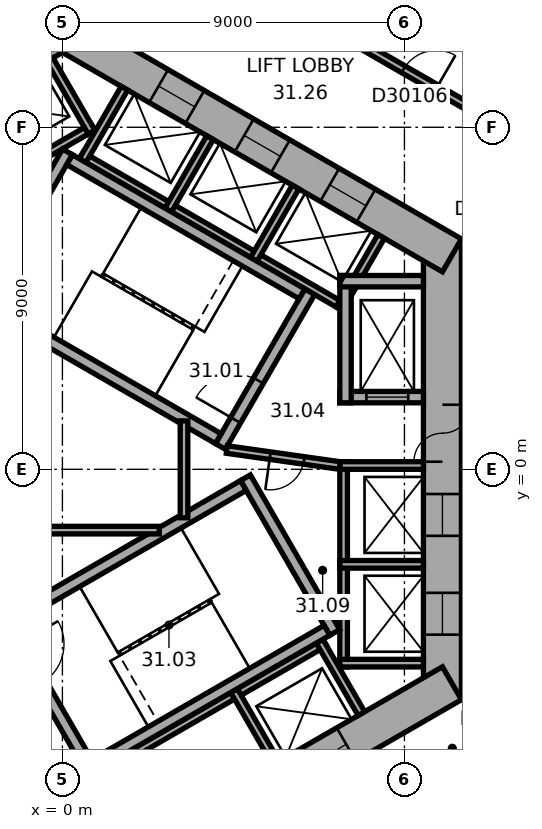
"""IFC4 building model, lengths in metres.
Left out: names, types, materials, properties, quantities, classifications, styles, units other than length and angle.
Written with IfcOpenShell. Run it as: python <this file> out.ifc"""

import sys

from ifc_helpers import new_model, si_unit, direction, frame, frame_2d, origin, place, context, subcontext, project, spatial, rectangle, extrude, element, fill, save


model = new_model("IFC4")
c1 = context("Model", 3, precision=1e-05, world=origin(), true_north=direction((0.0, 1.0)))
c2 = subcontext(c1, "Body", "Model", "MODEL_VIEW")
j1 = project(units=[si_unit("LENGTHUNIT", "METRE"), si_unit("PLANEANGLEUNIT", "RADIAN")], contexts=[c1])
p1 = place(None, origin())
s1 = spatial("IfcSite", under=j1, at=p1, CompositionType="ELEMENT")
p2 = place(p1, origin())
s2 = spatial("IfcBuilding", under=s1, at=p2, CompositionType="ELEMENT")
p3 = place(p2, frame((0.0, 0.0, 128.1)))
s3 = spatial("IfcBuildingStorey", under=s2, at=p3, CompositionType="ELEMENT", Elevation=128.1)
p4 = place(p3, frame((10.0, -6.062, 0.0), z_axis=(0.0, 0.0, 1.0), x_axis=(0.0, 1.0, 0.0)))
e1 = element("IfcWall", 1, at=p4, inside=s3, PredefinedType="SHEAR", context=c2, shape_type="SweptSolid", body=[
    extrude(rectangle(XDim=12.125, YDim=1.0, at=frame_2d((6.062, 0.0))), origin(), (0.0, 0.0, 1.0), 3.7),
])
p5 = place(p4, frame((6.262, 0.0, 0.0)))
e2 = element("IfcOpeningElement", 2, at=p5, cuts=e1, PredefinedType="OPENING", context=c2, shape_type="SweptSolid", body=[
    extrude(rectangle(XDim=1.5, YDim=2.1, at=frame_2d((0.75, 1.05))), frame((0.0, 0.51, 0.0), z_axis=(0.0, -1.0, 0.0), x_axis=(1.0, 0.0, 0.0)), (0.0, 0.0, 1.0), 1.02),
])
p6 = place(p4, frame((1.712, 0.0, 0.0)))
e3 = element("IfcOpeningElement", 3, at=p6, cuts=e1, PredefinedType="OPENING", context=c2, shape_type="SweptSolid", body=[
    extrude(rectangle(XDim=1.1, YDim=2.1, at=frame_2d((0.55, 1.05))), frame((0.0, 0.51, 0.0), z_axis=(0.0, -1.0, 0.0), x_axis=(1.0, 0.0, 0.0)), (0.0, 0.0, 1.0), 1.02),
])
p7 = place(p4, frame((4.312, 0.0, 0.0)))
e4 = element("IfcOpeningElement", 4, at=p7, cuts=e1, PredefinedType="OPENING", context=c2, shape_type="SweptSolid", body=[
    extrude(rectangle(XDim=1.1, YDim=2.1, at=frame_2d((0.55, 1.05))), frame((0.0, 0.51, 0.0), z_axis=(0.0, -1.0, 0.0), x_axis=(1.0, 0.0, 0.0)), (0.0, 0.0, 1.0), 1.02),
])
p8 = place(p3, frame((10.25, 5.629, 0.0), z_axis=(0.0, 0.0, 1.0), x_axis=(-0.866022616891, 0.50000482701, 0.0)))
e5 = element("IfcWall", 5, at=p8, inside=s3, PredefinedType="SHEAR", context=c2, shape_type="SweptSolid", body=[
    extrude(rectangle(XDim=12.125, YDim=1.0, at=frame_2d((6.062, 0.0))), origin(), (0.0, 0.0, 1.0), 3.7),
])
p9 = place(p8, frame((2.612, 0.0, 0.0)))
e6 = element("IfcOpeningElement", 6, at=p9, cuts=e5, PredefinedType="OPENING", context=c2, shape_type="SweptSolid", body=[
    extrude(rectangle(XDim=1.1, YDim=2.1, at=frame_2d((0.55, 1.05))), frame((0.0, 0.51, 0.0), z_axis=(0.0, -1.0, 0.0), x_axis=(1.0, 0.0, 0.0)), (0.0, 0.0, 1.0), 1.02),
])
p10 = place(p8, frame((5.212, 0.0, 0.0)))
e7 = element("IfcOpeningElement", 7, at=p10, cuts=e5, PredefinedType="OPENING", context=c2, shape_type="SweptSolid", body=[
    extrude(rectangle(XDim=1.1, YDim=2.1, at=frame_2d((0.55, 1.05))), frame((0.0, 0.51, 0.0), z_axis=(0.0, -1.0, 0.0), x_axis=(1.0, 0.0, 0.0)), (0.0, 0.0, 1.0), 1.02),
])
p11 = place(p8, frame((7.812, 0.0, 0.0)))
e8 = element("IfcOpeningElement", 8, at=p11, cuts=e5, PredefinedType="OPENING", context=c2, shape_type="SweptSolid", body=[
    extrude(rectangle(XDim=1.1, YDim=2.1, at=frame_2d((0.55, 1.05))), frame((0.0, 0.51, 0.0), z_axis=(0.0, -1.0, 0.0), x_axis=(1.0, 0.0, 0.0)), (0.0, 0.0, 1.0), 1.02),
])
p12 = place(p3, frame((0.25, 11.691, 0.0), z_axis=(0.0, 0.0, 1.0), x_axis=(-0.866022616891, -0.50000482701, 0.0)))
e9 = element("IfcWall", 9, at=p12, inside=s3, PredefinedType="SHEAR", context=c2, shape_type="SweptSolid", body=[
    extrude(rectangle(XDim=12.125, YDim=1.0, at=frame_2d((6.062, 0.0))), origin(), (0.0, 0.0, 1.0), 3.7),
])
p13 = place(p12, frame((6.262, 0.0, 0.0)))
e10 = element("IfcOpeningElement", 10, at=p13, cuts=e9, PredefinedType="OPENING", context=c2, shape_type="SweptSolid", body=[
    extrude(rectangle(XDim=1.5, YDim=2.1, at=frame_2d((0.75, 1.05))), frame((0.0, 0.51, 0.0), z_axis=(0.0, -1.0, 0.0), x_axis=(1.0, 0.0, 0.0)), (0.0, 0.0, 1.0), 1.02),
])
p14 = place(p12, frame((1.712, 0.0, 0.0)))
e11 = element("IfcOpeningElement", 11, at=p14, cuts=e9, PredefinedType="OPENING", context=c2, shape_type="SweptSolid", body=[
    extrude(rectangle(XDim=1.1, YDim=2.1, at=frame_2d((0.55, 1.05))), frame((0.0, 0.51, 0.0), z_axis=(0.0, -1.0, 0.0), x_axis=(1.0, 0.0, 0.0)), (0.0, 0.0, 1.0), 1.02),
])
p15 = place(p3, frame((-10.25, -5.629, 0.0), z_axis=(0.0, 0.0, 1.0), x_axis=(0.866022616891, -0.50000482701, 0.0)))
e12 = element("IfcWall", 12, at=p15, inside=s3, PredefinedType="SHEAR", context=c2, shape_type="SweptSolid", body=[
    extrude(rectangle(XDim=12.125, YDim=1.0, at=frame_2d((6.062, 0.0))), origin(), (0.0, 0.0, 1.0), 3.7),
])
p16 = place(p15, frame((6.262, 0.0, 0.0)))
e13 = element("IfcOpeningElement", 13, at=p16, cuts=e12, PredefinedType="OPENING", context=c2, shape_type="SweptSolid", body=[
    extrude(rectangle(XDim=1.5, YDim=2.1, at=frame_2d((0.75, 1.05))), frame((0.0, 0.51, 0.0), z_axis=(0.0, -1.0, 0.0), x_axis=(1.0, 0.0, 0.0)), (0.0, 0.0, 1.0), 1.02),
])
p17 = place(p15, frame((1.812, 0.0, 0.0)))
e14 = element("IfcOpeningElement", 14, at=p17, cuts=e12, PredefinedType="OPENING", context=c2, shape_type="SweptSolid", body=[
    extrude(rectangle(XDim=0.9, YDim=2.1, at=frame_2d((0.45, 1.05))), frame((0.0, 0.51, 0.0), z_axis=(0.0, -1.0, 0.0), x_axis=(1.0, 0.0, 0.0)), (0.0, 0.0, 1.0), 1.02),
])
p18 = place(p15, frame((4.412, 0.0, 0.0)))
e15 = element("IfcOpeningElement", 15, at=p18, cuts=e12, PredefinedType="OPENING", context=c2, shape_type="SweptSolid", body=[
    extrude(rectangle(XDim=0.9, YDim=2.1, at=frame_2d((0.45, 1.05))), frame((0.0, 0.51, 0.0), z_axis=(0.0, -1.0, 0.0), x_axis=(1.0, 0.0, 0.0)), (0.0, 0.0, 1.0), 1.02),
])
p19 = place(p3, frame((-0.25, -11.691, 0.0), z_axis=(0.0, 0.0, 1.0), x_axis=(0.866022616891, 0.50000482701, 0.0)))
e16 = element("IfcWall", 16, at=p19, inside=s3, PredefinedType="SHEAR", context=c2, shape_type="SweptSolid", body=[
    extrude(rectangle(XDim=12.125, YDim=1.0, at=frame_2d((6.062, 0.0))), origin(), (0.0, 0.0, 1.0), 3.7),
])
p20 = place(p19, frame((4.012, 0.0, 0.0)))
e17 = element("IfcOpeningElement", 17, at=p20, cuts=e16, PredefinedType="OPENING", context=c2, shape_type="SweptSolid", body=[
    extrude(rectangle(XDim=0.9, YDim=2.1, at=frame_2d((0.45, 1.05))), frame((0.0, 0.51, 0.0), z_axis=(0.0, -1.0, 0.0), x_axis=(1.0, 0.0, 0.0)), (0.0, 0.0, 1.0), 1.02),
])
p21 = place(p19, frame((7.812, 0.0, 0.0)))
e18 = element("IfcOpeningElement", 18, at=p21, cuts=e16, PredefinedType="OPENING", context=c2, shape_type="SweptSolid", body=[
    extrude(rectangle(XDim=1.1, YDim=2.1, at=frame_2d((0.55, 1.05))), frame((0.0, 0.51, 0.0), z_axis=(0.0, -1.0, 0.0), x_axis=(1.0, 0.0, 0.0)), (0.0, 0.0, 1.0), 1.02),
])
p22 = place(p3, frame((7.4, -5.2, 0.0), z_axis=(0.0, 0.0, 1.0), x_axis=(0.0, 1.0, 0.0)))
e19 = element("IfcWall", 19, at=p22, inside=s3, PredefinedType="PARTITIONING", context=c2, shape_type="SweptSolid", body=[
    extrude(rectangle(XDim=5.4, YDim=0.2, at=frame_2d((2.7, 0.0))), origin(), (0.0, 0.0, 1.0), 3.42),
])
for number, where, z_axis, x_axis in (
    (20, (7.3, -5.1, 0.0), (0.0, 0.0, 1.0), (1.0, 0.0, 0.0)),
    (21, (7.3, -2.5, 0.0), (0.0, 0.0, 1.0), (1.0, 0.0, 0.0)),
    (22, (7.3, 0.1, 0.0), (0.0, 0.0, 1.0), (1.0, 0.0, 0.0)),
):
    element("IfcWall", number, at=place(p3, frame(where, z_axis=z_axis, x_axis=x_axis)), inside=s3, PredefinedType="PARTITIONING", context=c2, shape_type="SweptSolid", body=[
        extrude(rectangle(XDim=2.2, YDim=0.2, at=frame_2d((1.1, 0.0))), origin(), (0.0, 0.0, 1.0), 3.42),
    ])
p23 = place(p3, frame((7.424, 4.259, 0.0), z_axis=(0.0, 0.0, 1.0), x_axis=(-0.866026010844, 0.49999894854, 0.0)))
e23 = element("IfcWall", 23, at=p23, inside=s3, PredefinedType="PARTITIONING", context=c2, shape_type="SweptSolid", body=[
    extrude(rectangle(XDim=8.0, YDim=0.2, at=frame_2d((4.0, 0.0))), origin(), (0.0, 0.0, 1.0), 3.42),
])
for number, where, z_axis, x_axis in (
    (24, (7.287, 4.222, 0.0), (0.0, 0.0, 1.0), (0.5, 0.866, 0.0)),
    (25, (5.036, 5.522, 0.0), (0.0, 0.0, 1.0), (0.5, 0.866, 0.0)),
    (26, (2.784, 6.822, 0.0), (0.0, 0.0, 1.0), (0.5, 0.866, 0.0)),
    (27, (0.532, 8.122, 0.0), (0.0, 0.0, 1.0), (0.5, 0.866, 0.0)),
):
    element("IfcWall", number, at=place(p3, frame(where, z_axis=z_axis, x_axis=x_axis)), inside=s3, PredefinedType="PARTITIONING", context=c2, shape_type="SweptSolid", body=[
        extrude(rectangle(XDim=2.2, YDim=0.2, at=frame_2d((1.1, 0.0))), origin(), (0.0, 0.0, 1.0), 3.42),
    ])
p24 = place(p3, frame((0.803, 9.009, 0.0), z_axis=(0.0, 0.0, 1.0), x_axis=(-0.866028230842, -0.499995103361, 0.0)))
e28 = element("IfcWall", 28, at=p24, inside=s3, PredefinedType="PARTITIONING", context=c2, shape_type="SweptSolid", body=[
    extrude(rectangle(XDim=5.4, YDim=0.2, at=frame_2d((2.7, 0.0))), origin(), (0.0, 0.0, 1.0), 3.42),
])
p25 = place(p3, frame((0.767, 8.872, 0.0), z_axis=(0.0, 0.0, 1.0), x_axis=(-0.499994660107, 0.866028486751, 0.0)))
e29 = element("IfcWall", 29, at=p25, inside=s3, PredefinedType="PARTITIONING", context=c2, shape_type="SweptSolid", body=[
    extrude(rectangle(XDim=2.2, YDim=0.2, at=frame_2d((1.1, 0.0))), origin(), (0.0, 0.0, 1.0), 3.42),
])
p26 = place(p3, frame((-0.024, -8.559, 0.0), z_axis=(0.0, 0.0, 1.0), x_axis=(0.866026010844, 0.49999894854, 0.0)))
e30 = element("IfcWall", 30, at=p26, inside=s3, PredefinedType="PARTITIONING", context=c2, shape_type="SweptSolid", body=[
    extrude(rectangle(XDim=8.0, YDim=0.2, at=frame_2d((4.0, 0.0))), origin(), (0.0, 0.0, 1.0), 3.42),
])
for number, where, z_axis, x_axis in (
    (31, (4.516, -5.822, 0.0), (0.0, 0.0, 1.0), (0.5, -0.866, 0.0)),
    (32, (6.768, -4.522, 0.0), (0.0, 0.0, 1.0), (0.5, -0.866, 0.0)),
):
    element("IfcWall", number, at=place(p3, frame(where, z_axis=z_axis, x_axis=x_axis)), inside=s3, PredefinedType="PARTITIONING", context=c2, shape_type="SweptSolid", body=[
        extrude(rectangle(XDim=2.2, YDim=0.2, at=frame_2d((1.1, 0.0))), origin(), (0.0, 0.0, 1.0), 3.42),
    ])
p27 = place(p3, frame((4.158, 0.602, 0.0), z_axis=(0.0, 0.0, 1.0), x_axis=(0.499977259774, 0.866038532462, 0.0)))
e33 = element("IfcWall", 33, at=p27, inside=s3, PredefinedType="SHEAR", context=c2, shape_type="SweptSolid", body=[
    extrude(rectangle(XDim=4.7, YDim=0.3, at=frame_2d((2.35, 0.0))), origin(), (0.0, 0.0, 1.0), 3.42),
])
p28 = place(p27, frame((0.8, 0.0, 0.0)))
e34 = element("IfcOpeningElement", 34, at=p28, cuts=e33, PredefinedType="OPENING", context=c2, shape_type="SweptSolid", body=[
    extrude(rectangle(XDim=1.2, YDim=2.1, at=frame_2d((0.6, 1.05))), frame((0.0, 0.16, 0.0), z_axis=(0.0, -1.0, 0.0), x_axis=(1.0, 0.0, 0.0)), (0.0, 0.0, 1.0), 0.32),
])
p29 = place(p3, frame((-2.216, 4.282, 0.0), z_axis=(0.0, 0.0, 1.0), x_axis=(0.499977259774, 0.866038532462, 0.0)))
e35 = element("IfcWall", 35, at=p29, inside=s3, PredefinedType="SHEAR", context=c2, shape_type="SweptSolid", body=[
    extrude(rectangle(XDim=4.7, YDim=0.3, at=frame_2d((2.35, 0.0))), origin(), (0.0, 0.0, 1.0), 3.42),
])
for number, where, z_axis, x_axis in (
    (36, (4.103, 0.807, 0.0), (0.0, 0.0, 1.0), (-0.866, 0.5, 0.0)),
    (37, (6.303, 4.617, 0.0), (0.0, 0.0, 1.0), (-0.866, 0.5, 0.0)),
):
    element("IfcWall", number, at=place(p3, frame(where, z_axis=z_axis, x_axis=x_axis)), inside=s3, PredefinedType="SHEAR", context=c2, shape_type="SweptSolid", body=[
        extrude(rectangle(XDim=7.06, YDim=0.3, at=frame_2d((3.53, 0.0))), origin(), (0.0, 0.0, 1.0), 3.42),
    ])
p30 = place(p3, frame((-1.558, -3.902, 0.0), z_axis=(0.0, 0.0, 1.0), x_axis=(0.499977259774, -0.866038532462, 0.0)))
e38 = element("IfcWall", 38, at=p30, inside=s3, PredefinedType="SHEAR", context=c2, shape_type="SweptSolid", body=[
    extrude(rectangle(XDim=4.7, YDim=0.3, at=frame_2d((2.35, 0.0))), origin(), (0.0, 0.0, 1.0), 3.42),
])
p31 = place(p30, frame((0.8, 0.0, 0.0)))
e39 = element("IfcOpeningElement", 39, at=p31, cuts=e38, PredefinedType="OPENING", context=c2, shape_type="SweptSolid", body=[
    extrude(rectangle(XDim=1.2, YDim=2.1, at=frame_2d((0.6, 1.05))), frame((0.0, 0.16, 0.0), z_axis=(0.0, -1.0, 0.0), x_axis=(1.0, 0.0, 0.0)), (0.0, 0.0, 1.0), 0.32),
])
p32 = place(p3, frame((4.816, -0.222, 0.0), z_axis=(0.0, 0.0, 1.0), x_axis=(0.499977259774, -0.866038532462, 0.0)))
e40 = element("IfcWall", 40, at=p32, inside=s3, PredefinedType="SHEAR", context=c2, shape_type="SweptSolid", body=[
    extrude(rectangle(XDim=4.7, YDim=0.3, at=frame_2d((2.35, 0.0))), origin(), (0.0, 0.0, 1.0), 3.42),
])
for number, where, z_axis, x_axis in (
    (41, (-1.353, -3.957, 0.0), (0.0, 0.0, 1.0), (0.866, 0.5, 0.0)),
    (42, (0.847, -7.767, 0.0), (0.0, 0.0, 1.0), (0.866, 0.5, 0.0)),
):
    element("IfcWall", number, at=place(p3, frame(where, z_axis=z_axis, x_axis=x_axis)), inside=s3, PredefinedType="SHEAR", context=c2, shape_type="SweptSolid", body=[
        extrude(rectangle(XDim=7.06, YDim=0.3, at=frame_2d((3.53, 0.0))), origin(), (0.0, 0.0, 1.0), 3.42),
    ])
p33 = place(p3, frame((7.3, 1.9, 0.0), z_axis=(0.0, 0.0, 1.0), x_axis=(1.0, 0.0, 0.0)))
e43 = element("IfcWall", 43, at=p33, inside=s3, PredefinedType="SHEAR", context=c2, shape_type="SweptSolid", body=[
    extrude(rectangle(XDim=2.2, YDim=0.3, at=frame_2d((1.1, 0.0))), origin(), (0.0, 0.0, 1.0), 3.42),
])
p34 = place(p33, frame((0.7, 0.0, 0.0)))
e44 = element("IfcOpeningElement", 44, at=p34, cuts=e43, PredefinedType="OPENING", context=c2, shape_type="SweptSolid", body=[
    extrude(rectangle(XDim=1.1, YDim=2.1, at=frame_2d((0.55, 1.05))), frame((0.0, 0.16, 0.0), z_axis=(0.0, -1.0, 0.0), x_axis=(1.0, 0.0, 0.0)), (0.0, 0.0, 1.0), 0.32),
])
p35 = place(p3, frame((7.45, 1.75, 0.0), z_axis=(0.0, 0.0, 1.0), x_axis=(0.0, 1.0, 0.0)))
e45 = element("IfcWall", 45, at=p35, inside=s3, PredefinedType="SHEAR", context=c2, shape_type="SweptSolid", body=[
    extrude(rectangle(XDim=3.35, YDim=0.3, at=frame_2d((1.675, 0.0))), origin(), (0.0, 0.0, 1.0), 3.42),
])
p36 = place(p3, frame((7.3, 4.95, 0.0), z_axis=(0.0, 0.0, 1.0), x_axis=(1.0, 0.0, 0.0)))
e46 = element("IfcWall", 46, at=p36, inside=s3, PredefinedType="SHEAR", context=c2, shape_type="SweptSolid", body=[
    extrude(rectangle(XDim=2.2, YDim=0.3, at=frame_2d((1.1, 0.0))), origin(), (0.0, 0.0, 1.0), 3.42),
])
p37 = place(p3, frame((4.327, 0.521, 0.0), z_axis=(0.0, 0.0, 1.0), x_axis=(0.990124376366, -0.14019172346, 0.0)))
e47 = element("IfcWall", 47, at=p37, inside=s3, PredefinedType="PARTITIONING", context=c2, shape_type="SweptSolid", body=[
    extrude(rectangle(XDim=3.002, YDim=0.2, at=frame_2d((1.501, 0.0))), origin(), (0.0, 0.0, 1.0), 3.42),
])
p38 = place(p37, frame((1.15, 0.0, 0.0)))
e48 = element("IfcOpeningElement", 48, at=p38, cuts=e47, PredefinedType="OPENING", context=c2, shape_type="SweptSolid", body=[
    extrude(rectangle(XDim=0.9, YDim=2.1, at=frame_2d((0.45, 1.05))), frame((0.0, 0.11, 0.0), z_axis=(0.0, -1.0, 0.0), x_axis=(1.0, 0.0, 0.0)), (0.0, 0.0, 1.0), 0.22),
])
p39 = place(p3, frame((-2.72, -1.6, 0.0), z_axis=(0.0, 0.0, 1.0), x_axis=(1.0, 0.0, 0.0)))
e49 = element("IfcWall", 49, at=p39, inside=s3, PredefinedType="PARTITIONING", context=c2, shape_type="SweptSolid", body=[
    extrude(rectangle(XDim=5.269, YDim=0.2, at=frame_2d((2.634, 0.0))), origin(), (0.0, 0.0, 1.0), 3.42),
])
p40 = place(p3, frame((3.2, -1.275, 0.0), z_axis=(0.0, 0.0, 1.0), x_axis=(0.0, 1.0, 0.0)))
e50 = element("IfcWall", 50, at=p40, inside=s3, PredefinedType="PARTITIONING", context=c2, shape_type="SweptSolid", body=[
    extrude(rectangle(XDim=2.549, YDim=0.2, at=frame_2d((1.275, 0.0))), origin(), (0.0, 0.0, 1.0), 3.42),
])
p41 = place(p3, frame((11.646, 8.981, 0.0), z_axis=(0.0, 0.0, 1.0), x_axis=(-0.866027142779, 0.499996987961, 0.0)))
e51 = element("IfcWall", 51, at=p41, inside=s3, PredefinedType="PARTITIONING", context=c2, shape_type="SweptSolid", body=[
    extrude(rectangle(XDim=9.597, YDim=0.2, at=frame_2d((4.798, 0.0))), origin(), (0.0, 0.0, 1.0), 3.42),
])
p42 = place(p41, frame((2.086, 0.0, 0.0)))
e52 = element("IfcOpeningElement", 52, at=p42, cuts=e51, PredefinedType="OPENING", context=c2, shape_type="SweptSolid", body=[
    extrude(rectangle(XDim=1.0, YDim=2.1, at=frame_2d((0.5, 1.05))), frame((0.0, 0.11, 0.0), z_axis=(0.0, -1.0, 0.0), x_axis=(1.0, 0.0, 0.0)), (0.0, 0.0, 1.0), 0.22),
])
p43 = place(p41, frame((8.01, 0.0, 0.0)))
e53 = element("IfcOpeningElement", 53, at=p43, cuts=e51, PredefinedType="OPENING", context=c2, shape_type="SweptSolid", body=[
    extrude(rectangle(XDim=1.0, YDim=2.1, at=frame_2d((0.5, 1.05))), frame((0.0, 0.11, 0.0), z_axis=(0.0, -1.0, 0.0), x_axis=(1.0, 0.0, 0.0)), (0.0, 0.0, 1.0), 0.22),
])
p44 = place(p5, origin())
e54 = element("IfcDoor", 54, at=p44, inside=s3, OperationType="DOUBLE_DOOR_SINGLE_SWING", PredefinedType="DOOR", context=c2, shape_type="SweptSolid", body=[
    extrude(rectangle(XDim=1.5, YDim=2.1, at=frame_2d((0.75, 1.05))), frame((0.0, 0.025, 0.0), z_axis=(0.0, -1.0, 0.0), x_axis=(1.0, 0.0, 0.0)), (0.0, 0.0, 1.0), 0.05),
])
fill(e2, e54)
p45 = place(p28, origin())
e55 = element("IfcDoor", 55, at=p45, inside=s3, OperationType="SINGLE_SWING_RIGHT", PredefinedType="DOOR", context=c2, shape_type="SweptSolid", body=[
    extrude(rectangle(XDim=1.2, YDim=2.1, at=frame_2d((0.6, 1.05))), frame((0.0, 0.025, 0.0), z_axis=(0.0, -1.0, 0.0), x_axis=(1.0, 0.0, 0.0)), (0.0, 0.0, 1.0), 0.05),
])
fill(e34, e55)
p46 = place(p38, origin())
e56 = element("IfcDoor", 56, at=p46, inside=s3, OperationType="SINGLE_SWING_LEFT", PredefinedType="DOOR", context=c2, shape_type="SweptSolid", body=[
    extrude(rectangle(XDim=0.9, YDim=2.1, at=frame_2d((0.45, 1.05))), frame((0.0, 0.025, 0.0), z_axis=(0.0, -1.0, 0.0), x_axis=(1.0, 0.0, 0.0)), (0.0, 0.0, 1.0), 0.05),
])
fill(e48, e56)
p47 = place(p34, origin())
e57 = element("IfcDoor", 57, at=p47, inside=s3, OperationType="DOUBLE_DOOR_SLIDING", PredefinedType="DOOR", context=c2, shape_type="SweptSolid", body=[
    extrude(rectangle(XDim=1.1, YDim=2.1, at=frame_2d((0.55, 1.05))), frame((0.0, 0.025, 0.0), z_axis=(0.0, -1.0, 0.0), x_axis=(1.0, 0.0, 0.0)), (0.0, 0.0, 1.0), 0.05),
])
fill(e44, e57)
p48 = place(p6, origin())
e58 = element("IfcDoor", 58, at=p48, inside=s3, OperationType="DOUBLE_DOOR_SLIDING", PredefinedType="DOOR", context=c2, shape_type="SweptSolid", body=[
    extrude(rectangle(XDim=1.1, YDim=2.1, at=frame_2d((0.55, 1.05))), frame((0.0, 0.025, 0.0), z_axis=(0.0, -1.0, 0.0), x_axis=(1.0, 0.0, 0.0)), (0.0, 0.0, 1.0), 0.05),
])
fill(e3, e58)
p49 = place(p7, origin())
e59 = element("IfcDoor", 59, at=p49, inside=s3, OperationType="DOUBLE_DOOR_SLIDING", PredefinedType="DOOR", context=c2, shape_type="SweptSolid", body=[
    extrude(rectangle(XDim=1.1, YDim=2.1, at=frame_2d((0.55, 1.05))), frame((0.0, 0.025, 0.0), z_axis=(0.0, -1.0, 0.0), x_axis=(1.0, 0.0, 0.0)), (0.0, 0.0, 1.0), 0.05),
])
fill(e4, e59)
p50 = place(p9, origin())
e60 = element("IfcDoor", 60, at=p50, inside=s3, OperationType="DOUBLE_DOOR_SLIDING", PredefinedType="DOOR", context=c2, shape_type="SweptSolid", body=[
    extrude(rectangle(XDim=1.1, YDim=2.1, at=frame_2d((0.55, 1.05))), frame((0.0, 0.025, 0.0), z_axis=(0.0, -1.0, 0.0), x_axis=(1.0, 0.0, 0.0)), (0.0, 0.0, 1.0), 0.05),
])
fill(e6, e60)
p51 = place(p10, origin())
e61 = element("IfcDoor", 61, at=p51, inside=s3, OperationType="DOUBLE_DOOR_SLIDING", PredefinedType="DOOR", context=c2, shape_type="SweptSolid", body=[
    extrude(rectangle(XDim=1.1, YDim=2.1, at=frame_2d((0.55, 1.05))), frame((0.0, 0.025, 0.0), z_axis=(0.0, -1.0, 0.0), x_axis=(1.0, 0.0, 0.0)), (0.0, 0.0, 1.0), 0.05),
])
fill(e7, e61)
p52 = place(p11, origin())
e62 = element("IfcDoor", 62, at=p52, inside=s3, OperationType="DOUBLE_DOOR_SLIDING", PredefinedType="DOOR", context=c2, shape_type="SweptSolid", body=[
    extrude(rectangle(XDim=1.1, YDim=2.1, at=frame_2d((0.55, 1.05))), frame((0.0, 0.025, 0.0), z_axis=(0.0, -1.0, 0.0), x_axis=(1.0, 0.0, 0.0)), (0.0, 0.0, 1.0), 0.05),
])
fill(e8, e62)
p53 = place(p21, origin())
e63 = element("IfcDoor", 63, at=p53, inside=s3, OperationType="DOUBLE_DOOR_SLIDING", PredefinedType="DOOR", context=c2, shape_type="SweptSolid", body=[
    extrude(rectangle(XDim=1.1, YDim=2.1, at=frame_2d((0.55, 1.05))), frame((0.0, 0.025, 0.0), z_axis=(0.0, -1.0, 0.0), x_axis=(1.0, 0.0, 0.0)), (0.0, 0.0, 1.0), 0.05),
])
fill(e18, e63)
p54 = place(p42, origin())
e64 = element("IfcDoor", 64, at=p54, inside=s3, OperationType="SINGLE_SWING_LEFT", PredefinedType="DOOR", context=c2, shape_type="SweptSolid", body=[
    extrude(rectangle(XDim=1.0, YDim=2.1, at=frame_2d((0.5, 1.05))), frame((0.0, 0.025, 0.0), z_axis=(0.0, -1.0, 0.0), x_axis=(1.0, 0.0, 0.0)), (0.0, 0.0, 1.0), 0.05),
])
fill(e52, e64)
save(model, sys.argv[1])
